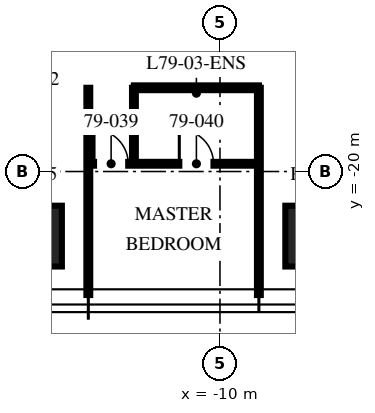
"""IFC4 building model, lengths in metres.
Left out: names, types, materials, properties, quantities, classifications, styles, units other than length and angle.
Written with IfcOpenShell. Run it as: python <this file> out.ifc"""

import sys

from ifc_helpers import new_model, si_unit, direction, frame, frame_2d, origin, origin_2d, place, context, subcontext, project, spatial, rectangle, extrude, element, fill, save


model = new_model("IFC4")
c1 = context("Model", 3, precision=1e-05, world=origin(), true_north=direction((0.0, 1.0)))
c2 = subcontext(c1, "Body", "Model", "MODEL_VIEW")
j1 = project(units=[si_unit("LENGTHUNIT", "METRE"), si_unit("PLANEANGLEUNIT", "RADIAN")], contexts=[c1])
p1 = place(None, origin())
s1 = spatial("IfcSite", under=j1, at=p1, CompositionType="ELEMENT")
p2 = place(p1, origin())
s2 = spatial("IfcBuilding", under=s1, at=p2, CompositionType="ELEMENT")
p3 = place(p2, frame((0.0, 0.0, 315.75)))
s3 = spatial("IfcBuildingStorey", under=s2, at=p3, CompositionType="ELEMENT", Elevation=315.75)
for number, where, z_axis, x_axis in (
    (1, (-7.48, -21.7, 0.0), (0.0, 0.0, 1.0), (1.0, 0.0, 0.0)),
    (2, (-14.96, -21.7, 0.0), (0.0, 0.0, 1.0), (1.0, 0.0, 0.0)),
):
    element("IfcColumn", number, at=place(p3, frame(where, z_axis=z_axis, x_axis=x_axis)), inside=s3, PredefinedType="COLUMN", context=c2, shape_type="SweptSolid", body=[
        extrude(rectangle(XDim=1.6, YDim=1.6, at=origin_2d()), origin(), (0.0, 0.0, 1.0), 3.75),
    ])
for number, where, z_axis, x_axis in (
    (3, (-13.464, -17.796, 0.0), (0.0, 0.0, 1.0), (0.0, -1.0, 0.0)),
    (4, (-8.976, -17.796, 0.0), (0.0, 0.0, 1.0), (0.0, -1.0, 0.0)),
):
    element("IfcWall", number, at=place(p3, frame(where, z_axis=z_axis, x_axis=x_axis)), inside=s3, PredefinedType="PARTITIONING", context=c2, shape_type="SweptSolid", body=[
        extrude(rectangle(XDim=5.454, YDim=0.1, at=frame_2d((2.727, 0.0))), origin(), (0.0, 0.0, 1.0), 3.01),
    ])
p4 = place(p3, frame((-13.464, -19.796, 0.0), z_axis=(0.0, 0.0, 1.0), x_axis=(1.0, 0.0, 0.0)))
e5 = element("IfcWall", 5, at=p4, inside=s3, PredefinedType="PARTITIONING", context=c2, shape_type="SweptSolid", body=[
    extrude(rectangle(XDim=4.488, YDim=0.1, at=frame_2d((2.244, 0.0))), origin(), (0.0, 0.0, 1.0), 2.91),
])
p5 = place(p4, frame((0.15, 0.0, 0.0)))
e6 = element("IfcOpeningElement", 6, at=p5, cuts=e5, PredefinedType="OPENING", context=c2, shape_type="SweptSolid", body=[
    extrude(rectangle(XDim=0.9, YDim=2.1, at=frame_2d((0.45, 1.05))), frame((0.0, 0.06, 0.0), z_axis=(0.0, -1.0, 0.0), x_axis=(1.0, 0.0, 0.0)), (0.0, 0.0, 1.0), 0.12),
])
p6 = place(p4, frame((2.394, 0.0, 0.0)))
e7 = element("IfcOpeningElement", 7, at=p6, cuts=e5, PredefinedType="OPENING", context=c2, shape_type="SweptSolid", body=[
    extrude(rectangle(XDim=0.9, YDim=2.1, at=frame_2d((0.45, 1.05))), frame((0.0, 0.06, 0.0), z_axis=(0.0, -1.0, 0.0), x_axis=(1.0, 0.0, 0.0)), (0.0, 0.0, 1.0), 0.12),
])
p7 = place(p3, frame((-12.264, -17.796, 0.0), z_axis=(0.0, 0.0, 1.0), x_axis=(0.0, -1.0, 0.0)))
e8 = element("IfcWall", 8, at=p7, inside=s3, PredefinedType="PARTITIONING", context=c2, shape_type="SweptSolid", body=[
    extrude(rectangle(XDim=2.0, YDim=0.1, at=frame_2d((1.0, 0.0))), origin(), (0.0, 0.0, 1.0), 3.5),
])
p8 = place(p3, frame((-12.264, -17.796, 0.0), z_axis=(0.0, 0.0, 1.0), x_axis=(1.0, 0.0, 0.0)))
e9 = element("IfcWall", 9, at=p8, inside=s3, PredefinedType="PARTITIONING", context=c2, shape_type="SweptSolid", body=[
    extrude(rectangle(XDim=3.288, YDim=0.125, at=frame_2d((1.644, 0.0))), origin(), (0.0, 0.0, 1.0), 2.91),
])
p9 = place(p5, origin())
e10 = element("IfcDoor", 10, at=p9, inside=s3, OperationType="SINGLE_SWING_LEFT", PredefinedType="DOOR", context=c2, shape_type="SweptSolid", body=[
    extrude(rectangle(XDim=0.9, YDim=2.1, at=frame_2d((0.45, 1.05))), frame((0.0, 0.025, 0.0), z_axis=(0.0, -1.0, 0.0), x_axis=(1.0, 0.0, 0.0)), (0.0, 0.0, 1.0), 0.05),
])
fill(e6, e10)
p10 = place(p6, origin())
e11 = element("IfcDoor", 11, at=p10, inside=s3, OperationType="SINGLE_SWING_LEFT", PredefinedType="DOOR", context=c2, shape_type="SweptSolid", body=[
    extrude(rectangle(XDim=0.9, YDim=2.1, at=frame_2d((0.45, 1.05))), frame((0.0, 0.025, 0.0), z_axis=(0.0, -1.0, 0.0), x_axis=(1.0, 0.0, 0.0)), (0.0, 0.0, 1.0), 0.05),
])
fill(e7, e11)
save(model, sys.argv[1])
